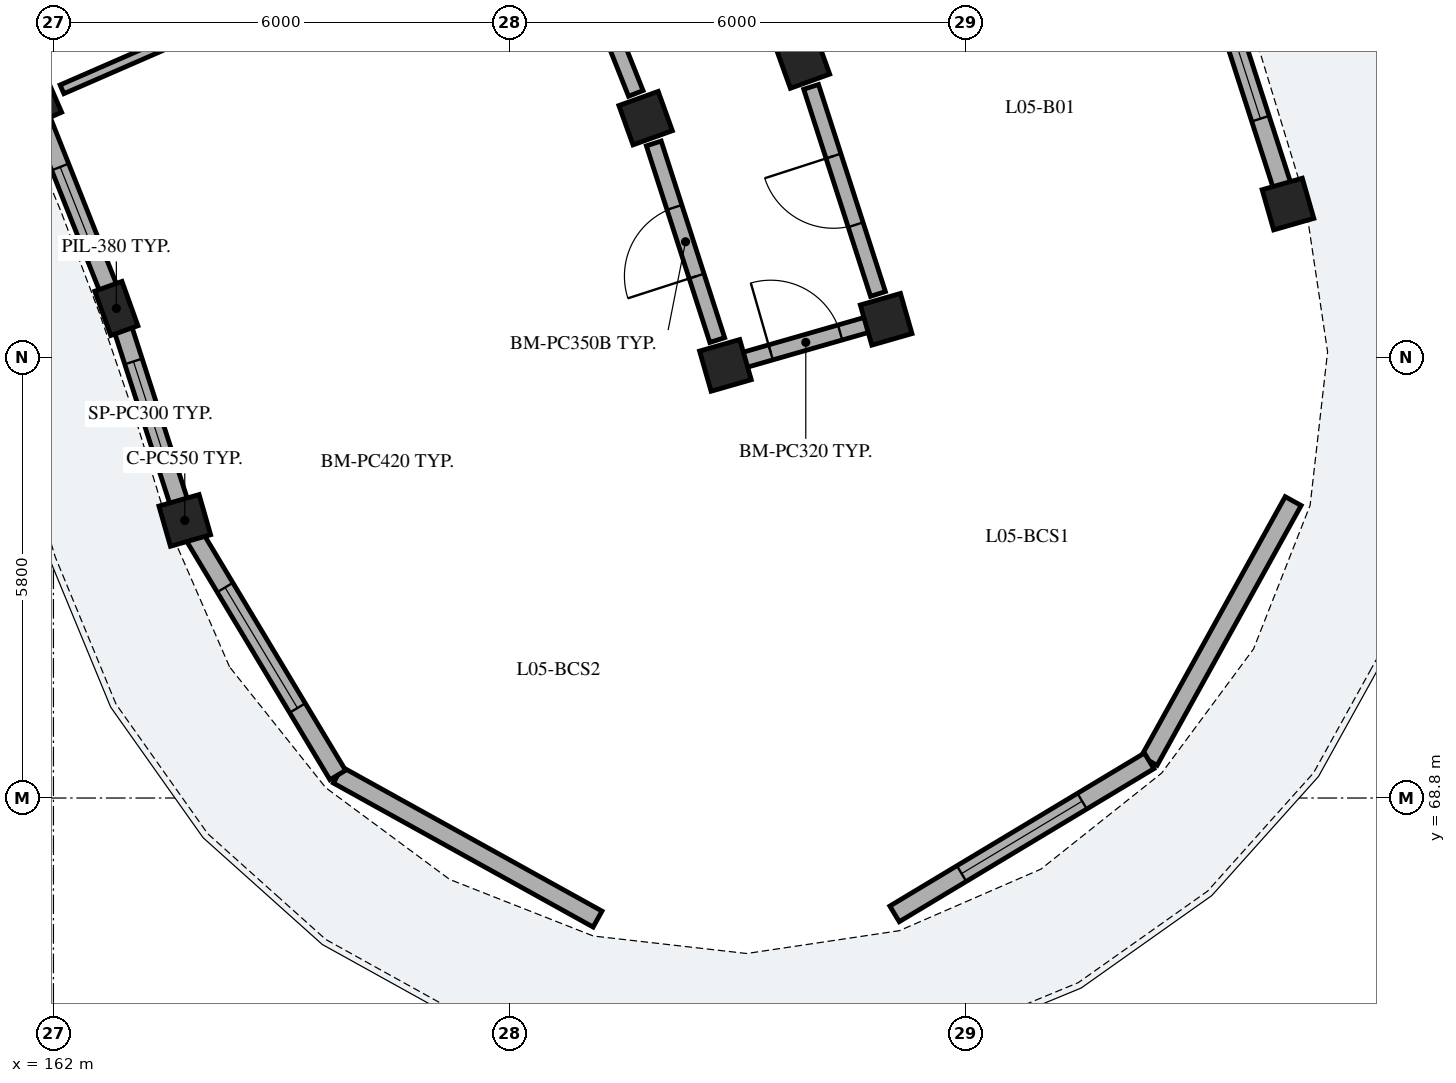
"""IFC4 building model, lengths in metres.
Left out: names, types, materials, properties, quantities, classifications, styles, units other than length and angle.
Written with IfcOpenShell. Run it as: python <this file> out.ifc"""

import sys

from ifc_helpers import new_model, si_unit, direction, frame, frame_2d, origin, origin_2d, place, context, subcontext, project, spatial, rectangle, extrude, element, fill, save


model = new_model("IFC4")
c1 = context("Model", 3, precision=1e-05, world=origin(), true_north=direction((0.0, 1.0)))
c2 = subcontext(c1, "Body", "Model", "MODEL_VIEW")
j1 = project(units=[si_unit("LENGTHUNIT", "METRE"), si_unit("PLANEANGLEUNIT", "RADIAN")], contexts=[c1])
p1 = place(None, origin())
s1 = spatial("IfcSite", under=j1, at=p1, CompositionType="ELEMENT")
p2 = place(p1, origin())
s2 = spatial("IfcBuilding", under=s1, at=p2, CompositionType="ELEMENT")
p3 = place(p2, frame((0.0, 0.0, 18.92)))
s3 = spatial("IfcBuildingStorey", under=s2, at=p3, CompositionType="ELEMENT", Elevation=18.92)
for number, where, z_axis, x_axis in (
    (1, (163.728, 72.452, 0.0), (0.0, 0.0, 1.0), (0.961, 0.276, 0.0)),
    (2, (170.841, 74.492, 0.0), (0.0, 0.0, 1.0), (0.961, 0.276, 0.0)),
    (3, (172.956, 75.098, 0.0), (0.0, 0.0, 1.0), (0.961, 0.276, 0.0)),
    (4, (178.243, 76.614, 0.0), (0.0, 0.0, 1.0), (0.961, 0.276, 0.0)),
):
    element("IfcColumn", number, at=place(p3, frame(where, z_axis=z_axis, x_axis=x_axis)), inside=s3, PredefinedType="COLUMN", context=c2, shape_type="SweptSolid", body=[
        extrude(rectangle(XDim=0.55, YDim=0.55, at=origin_2d()), origin(), (0.0, 0.0, 1.0), 3.11),
    ])
p4 = place(p3, frame((162.828, 75.241, 0.0), z_axis=(0.0, 0.0, 1.0), x_axis=(0.941012076693, 0.338372976931, 0.0)))
e5 = element("IfcColumn", 5, at=p4, inside=s3, PredefinedType="PILASTER", context=c2, shape_type="SweptSolid", body=[
    extrude(rectangle(XDim=0.38, YDim=0.62, at=origin_2d()), origin(), (0.0, 0.0, 1.0), 3.11),
])
for number, where, z_axis, x_axis in (
    (6, (169.792, 77.745, 0.0), (0.0, 0.0, 1.0), (0.941, 0.338, 0.0)),
    (7, (171.862, 78.489, 0.0), (0.0, 0.0, 1.0), (0.941, 0.338, 0.0)),
    (8, (161.746, 77.964, 0.0), (0.0, 0.0, 1.0), (0.917, 0.4, 0.0)),
):
    element("IfcColumn", number, at=place(p3, frame(where, z_axis=z_axis, x_axis=x_axis)), inside=s3, PredefinedType="COLUMN", context=c2, shape_type="SweptSolid", body=[
        extrude(rectangle(XDim=0.55, YDim=0.55, at=origin_2d()), origin(), (0.0, 0.0, 1.0), 3.11),
    ])
p5 = place(p3, frame((178.168, 76.847, 0.0), z_axis=(0.0, 0.0, 1.0), x_axis=(-0.30720538788, 0.951643236543, 0.0)))
e9 = element("IfcWall", 9, at=p5, inside=s3, PredefinedType="SOLIDWALL", context=c2, shape_type="SweptSolid", body=[
    extrude(rectangle(XDim=3.521, YDim=0.24, at=frame_2d((1.76, 0.0))), origin(), (0.0, 0.0, 1.0), 2.355),
])
p6 = place(p5, frame((0.935, 0.0, 0.35)))
e10 = element("IfcOpeningElement", 10, at=p6, cuts=e9, PredefinedType="OPENING", context=c2, shape_type="SweptSolid", body=[
    extrude(rectangle(XDim=1.65, YDim=1.8, at=frame_2d((0.825, 0.9))), frame((0.0, 0.13, 0.0), z_axis=(0.0, -1.0, 0.0), x_axis=(1.0, 0.0, 0.0)), (0.0, 0.0, 1.0), 0.26),
])
p7 = place(p3, frame((163.653, 72.685, 0.0), z_axis=(0.0, 0.0, 1.0), x_axis=(-0.30716379336, 0.951656662903, 0.0)))
e11 = element("IfcWall", 11, at=p7, inside=s3, PredefinedType="SOLIDWALL", context=c2, shape_type="SweptSolid", body=[
    extrude(rectangle(XDim=2.525, YDim=0.24, at=frame_2d((1.263, 0.0))), origin(), (0.0, 0.0, 1.0), 2.355),
])
p8 = place(p7, frame((0.573, 0.0, 0.55)))
e12 = element("IfcOpeningElement", 12, at=p8, cuts=e11, PredefinedType="OPENING", context=c2, shape_type="SweptSolid", body=[
    extrude(rectangle(XDim=1.38, YDim=1.56, at=frame_2d((0.69, 0.78))), frame((0.0, 0.13, 0.0), z_axis=(0.0, -1.0, 0.0), x_axis=(1.0, 0.0, 0.0)), (0.0, 0.0, 1.0), 0.26),
])
p9 = place(p3, frame((162.769, 75.389, 0.0), z_axis=(0.0, 0.0, 1.0), x_axis=(-0.369122600107, 0.92938071106, 0.0)))
e13 = element("IfcWall", 13, at=p9, inside=s3, PredefinedType="SOLIDWALL", context=c2, shape_type="SweptSolid", body=[
    extrude(rectangle(XDim=2.525, YDim=0.24, at=frame_2d((1.263, 0.0))), origin(), (0.0, 0.0, 1.0), 2.355),
])
p10 = place(p9, frame((0.683, 0.0, 0.55)))
e14 = element("IfcOpeningElement", 14, at=p10, cuts=e13, PredefinedType="OPENING", context=c2, shape_type="SweptSolid", body=[
    extrude(rectangle(XDim=1.16, YDim=1.485, at=frame_2d((0.58, 0.743))), frame((0.0, 0.13, 0.0), z_axis=(0.0, -1.0, 0.0), x_axis=(1.0, 0.0, 0.0)), (0.0, 0.0, 1.0), 0.26),
])
p11 = place(p3, frame((178.311, 72.707, 0.0), z_axis=(0.0, 0.0, 1.0), x_axis=(-0.484841794757, -0.874601871743, 0.0)))
e15 = element("IfcWall", 15, at=p11, inside=s3, PredefinedType="SOLIDWALL", context=c2, shape_type="SweptSolid", body=[
    extrude(rectangle(XDim=3.908, YDim=0.24, at=frame_2d((1.954, 0.0))), origin(), (0.0, 0.0, 1.0), 2.355),
])
p12 = place(p3, frame((176.417, 69.289, 0.0), z_axis=(0.0, 0.0, 1.0), x_axis=(-0.85715098885, -0.515065221417, 0.0)))
e16 = element("IfcWall", 16, at=p12, inside=s3, PredefinedType="SOLIDWALL", context=c2, shape_type="SweptSolid", body=[
    extrude(rectangle(XDim=3.908, YDim=0.24, at=frame_2d((1.954, 0.0))), origin(), (0.0, 0.0, 1.0), 2.355),
])
p13 = place(p12, frame((1.029, 0.0, 0.4)))
e17 = element("IfcOpeningElement", 17, at=p13, cuts=e16, PredefinedType="OPENING", context=c2, shape_type="SweptSolid", body=[
    extrude(rectangle(XDim=1.85, YDim=1.72, at=frame_2d((0.925, 0.86))), frame((0.0, 0.13, 0.0), z_axis=(0.0, -1.0, 0.0), x_axis=(1.0, 0.0, 0.0)), (0.0, 0.0, 1.0), 0.26),
])
p14 = place(p3, frame((169.159, 67.208, 0.0), z_axis=(0.0, 0.0, 1.0), x_axis=(-0.874643043537, 0.484767517881, 0.0)))
e18 = element("IfcWall", 18, at=p14, inside=s3, PredefinedType="SOLIDWALL", context=c2, shape_type="SweptSolid", body=[
    extrude(rectangle(XDim=3.908, YDim=0.24, at=frame_2d((1.954, 0.0))), origin(), (0.0, 0.0, 1.0), 2.355),
])
p15 = place(p3, frame((165.741, 69.102, 0.0), z_axis=(0.0, 0.0, 1.0), x_axis=(-0.515037642827, 0.857167560324, 0.0)))
e19 = element("IfcWall", 19, at=p15, inside=s3, PredefinedType="SOLIDWALL", context=c2, shape_type="SweptSolid", body=[
    extrude(rectangle(XDim=3.908, YDim=0.24, at=frame_2d((1.954, 0.0))), origin(), (0.0, 0.0, 1.0), 2.355),
])
p16 = place(p15, frame((1.029, 0.0, 0.4)))
e20 = element("IfcOpeningElement", 20, at=p16, cuts=e19, PredefinedType="OPENING", context=c2, shape_type="SweptSolid", body=[
    extrude(rectangle(XDim=1.85, YDim=1.72, at=frame_2d((0.925, 0.86))), frame((0.0, 0.13, 0.0), z_axis=(0.0, -1.0, 0.0), x_axis=(1.0, 0.0, 0.0)), (0.0, 0.0, 1.0), 0.26),
])
p17 = place(p3, frame((172.849, 75.431, 0.0), z_axis=(0.0, 0.0, 1.0), x_axis=(-0.307157249761, 0.951658774939, 0.0)))
e21 = element("IfcWall", 21, at=p17, inside=s3, PredefinedType="PARTITIONING", context=c2, shape_type="SweptSolid", body=[
    extrude(rectangle(XDim=2.863, YDim=0.205, at=frame_2d((1.432, 0.0))), origin(), (0.0, 0.0, 1.0), 2.37),
])
p18 = place(p17, frame((0.957, 0.0, 0.0)))
e22 = element("IfcOpeningElement", 22, at=p18, cuts=e21, PredefinedType="OPENING", context=c2, shape_type="SweptSolid", body=[
    extrude(rectangle(XDim=0.95, YDim=2.13, at=frame_2d((0.475, 1.065))), frame((0.0, 0.113, 0.0), z_axis=(0.0, -1.0, 0.0), x_axis=(1.0, 0.0, 0.0)), (0.0, 0.0, 1.0), 0.225),
])
p19 = place(p3, frame((170.734, 74.825, 0.0), z_axis=(0.0, 0.0, 1.0), x_axis=(-0.307186478934, 0.95164934044, 0.0)))
e23 = element("IfcWall", 23, at=p19, inside=s3, PredefinedType="PARTITIONING", context=c2, shape_type="SweptSolid", body=[
    extrude(rectangle(XDim=2.718, YDim=0.205, at=frame_2d((1.359, 0.0))), origin(), (0.0, 0.0, 1.0), 2.37),
])
p20 = place(p19, frame((0.884, 0.0, 0.0)))
e24 = element("IfcOpeningElement", 24, at=p20, cuts=e23, PredefinedType="OPENING", context=c2, shape_type="SweptSolid", body=[
    extrude(rectangle(XDim=0.95, YDim=2.13, at=frame_2d((0.475, 1.065))), frame((0.0, 0.113, 0.0), z_axis=(0.0, -1.0, 0.0), x_axis=(1.0, 0.0, 0.0)), (0.0, 0.0, 1.0), 0.225),
])
p21 = place(p3, frame((169.662, 78.07, 0.0), z_axis=(0.0, 0.0, 1.0), x_axis=(-0.369237170461, 0.929335198919, 0.0)))
e25 = element("IfcWall", 25, at=p21, inside=s3, PredefinedType="PARTITIONING", context=c2, shape_type="SweptSolid", body=[
    extrude(rectangle(XDim=2.718, YDim=0.205, at=frame_2d((1.359, 0.0))), origin(), (0.0, 0.0, 1.0), 2.37),
])
p22 = place(p21, frame((0.894, 0.0, 0.0)))
e26 = element("IfcOpeningElement", 26, at=p22, cuts=e25, PredefinedType="OPENING", context=c2, shape_type="SweptSolid", body=[
    extrude(rectangle(XDim=0.93, YDim=2.12, at=frame_2d((0.465, 1.06))), frame((0.0, 0.113, 0.0), z_axis=(0.0, -1.0, 0.0), x_axis=(1.0, 0.0, 0.0)), (0.0, 0.0, 1.0), 0.225),
])
p23 = place(p3, frame((162.113, 78.124, 0.0), z_axis=(0.0, 0.0, 1.0), x_axis=(0.916668515796, 0.399648385645, 0.0)))
e27 = element("IfcWall", 27, at=p23, inside=s3, PredefinedType="PARTITIONING", context=c2, shape_type="SweptSolid", body=[
    extrude(rectangle(XDim=6.6, YDim=0.125, at=frame_2d((3.3, 0.0))), origin(), (0.0, 0.0, 1.0), 2.37),
])
p24 = place(p23, frame((2.855, 0.0, 0.0)))
e28 = element("IfcOpeningElement", 28, at=p24, cuts=e27, PredefinedType="OPENING", context=c2, shape_type="SweptSolid", body=[
    extrude(rectangle(XDim=0.89, YDim=2.1, at=frame_2d((0.445, 1.05))), frame((0.0, 0.073, 0.0), z_axis=(0.0, -1.0, 0.0), x_axis=(1.0, 0.0, 0.0)), (0.0, 0.0, 1.0), 0.145),
])
p25 = place(p3, frame((170.889, 74.506, 0.0), z_axis=(0.0, 0.0, 1.0), x_axis=(0.961264701934, 0.275626872449, 0.0)))
e29 = element("IfcWall", 29, at=p25, inside=s3, PredefinedType="PARTITIONING", context=c2, shape_type="SweptSolid", body=[
    extrude(rectangle(XDim=2.1, YDim=0.205, at=frame_2d((1.05, 0.0))), origin(), (0.0, 0.0, 1.0), 2.37),
])
p26 = place(p25, frame((0.57, 0.0, 0.0)))
e30 = element("IfcOpeningElement", 30, at=p26, cuts=e29, PredefinedType="OPENING", context=c2, shape_type="SweptSolid", body=[
    extrude(rectangle(XDim=0.95, YDim=2.13, at=frame_2d((0.475, 1.065))), frame((0.0, 0.113, 0.0), z_axis=(0.0, -1.0, 0.0), x_axis=(1.0, 0.0, 0.0)), (0.0, 0.0, 1.0), 0.225),
])
p27 = place(p6, origin())
e31 = element("IfcWindow", 31, at=p27, inside=s3, PartitioningType="SINGLE_PANEL", PredefinedType="WINDOW", context=c2, shape_type="SweptSolid", body=[
    extrude(rectangle(XDim=1.65, YDim=1.8, at=frame_2d((0.825, 0.9))), frame((0.0, 0.03, 0.0), z_axis=(0.0, -1.0, 0.0), x_axis=(1.0, 0.0, 0.0)), (0.0, 0.0, 1.0), 0.06),
])
fill(e10, e31)
p28 = place(p8, origin())
e32 = element("IfcWindow", 32, at=p28, inside=s3, PartitioningType="SINGLE_PANEL", PredefinedType="WINDOW", context=c2, shape_type="SweptSolid", body=[
    extrude(rectangle(XDim=1.38, YDim=1.56, at=frame_2d((0.69, 0.78))), frame((0.0, 0.03, 0.0), z_axis=(0.0, -1.0, 0.0), x_axis=(1.0, 0.0, 0.0)), (0.0, 0.0, 1.0), 0.06),
])
fill(e12, e32)
p29 = place(p10, origin())
e33 = element("IfcWindow", 33, at=p29, inside=s3, PartitioningType="SINGLE_PANEL", PredefinedType="WINDOW", context=c2, shape_type="SweptSolid", body=[
    extrude(rectangle(XDim=1.16, YDim=1.485, at=frame_2d((0.58, 0.743))), frame((0.0, 0.03, 0.0), z_axis=(0.0, -1.0, 0.0), x_axis=(1.0, 0.0, 0.0)), (0.0, 0.0, 1.0), 0.06),
])
fill(e14, e33)
p30 = place(p13, origin())
e34 = element("IfcWindow", 34, at=p30, inside=s3, PartitioningType="SINGLE_PANEL", PredefinedType="WINDOW", context=c2, shape_type="SweptSolid", body=[
    extrude(rectangle(XDim=1.85, YDim=1.72, at=frame_2d((0.925, 0.86))), frame((0.0, 0.03, 0.0), z_axis=(0.0, -1.0, 0.0), x_axis=(1.0, 0.0, 0.0)), (0.0, 0.0, 1.0), 0.06),
])
fill(e17, e34)
p31 = place(p16, origin())
e35 = element("IfcWindow", 35, at=p31, inside=s3, PartitioningType="SINGLE_PANEL", PredefinedType="WINDOW", context=c2, shape_type="SweptSolid", body=[
    extrude(rectangle(XDim=1.85, YDim=1.72, at=frame_2d((0.925, 0.86))), frame((0.0, 0.03, 0.0), z_axis=(0.0, -1.0, 0.0), x_axis=(1.0, 0.0, 0.0)), (0.0, 0.0, 1.0), 0.06),
])
fill(e20, e35)
p32 = place(p18, origin())
e36 = element("IfcDoor", 36, at=p32, inside=s3, OperationType="SINGLE_SWING_RIGHT", PredefinedType="DOOR", context=c2, shape_type="SweptSolid", body=[
    extrude(rectangle(XDim=0.95, YDim=2.13, at=frame_2d((0.475, 1.065))), frame((0.0, 0.025, 0.0), z_axis=(0.0, -1.0, 0.0), x_axis=(1.0, 0.0, 0.0)), (0.0, 0.0, 1.0), 0.05),
])
fill(e22, e36)
p33 = place(p20, origin())
e37 = element("IfcDoor", 37, at=p33, inside=s3, OperationType="SINGLE_SWING_LEFT", PredefinedType="DOOR", context=c2, shape_type="SweptSolid", body=[
    extrude(rectangle(XDim=0.95, YDim=2.13, at=frame_2d((0.475, 1.065))), frame((0.0, 0.025, 0.0), z_axis=(0.0, -1.0, 0.0), x_axis=(1.0, 0.0, 0.0)), (0.0, 0.0, 1.0), 0.05),
])
fill(e24, e37)
p34 = place(p26, origin())
e38 = element("IfcDoor", 38, at=p34, inside=s3, OperationType="SINGLE_SWING_LEFT", PredefinedType="DOOR", context=c2, shape_type="SweptSolid", body=[
    extrude(rectangle(XDim=0.95, YDim=2.13, at=frame_2d((0.475, 1.065))), frame((0.0, 0.025, 0.0), z_axis=(0.0, -1.0, 0.0), x_axis=(1.0, 0.0, 0.0)), (0.0, 0.0, 1.0), 0.05),
])
fill(e30, e38)
save(model, sys.argv[1])
